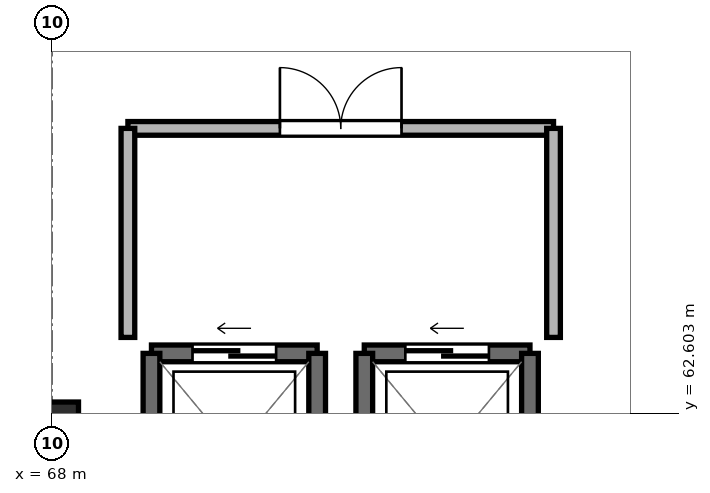
"""IFC4 building model, lengths in metres.
Left out: names, types, materials, properties, quantities, classifications, styles, units other than length and angle.
Written with IfcOpenShell. Run it as: python <this file> out.ifc"""

import sys

from ifc_helpers import new_model, si_unit, direction, frame, frame_2d, origin, origin_2d, place, context, subcontext, project, spatial, rectangle, extrude, element, fill, save


model = new_model("IFC4")
c1 = context("Model", 3, precision=1e-05, world=origin(), true_north=direction((0.0, 1.0)))
c2 = subcontext(c1, "Body", "Model", "MODEL_VIEW")
j1 = project(units=[si_unit("LENGTHUNIT", "METRE"), si_unit("PLANEANGLEUNIT", "RADIAN")], contexts=[c1])
p1 = place(None, origin())
s1 = spatial("IfcSite", under=j1, at=p1, CompositionType="ELEMENT")
p2 = place(p1, origin())
s2 = spatial("IfcBuilding", under=s1, at=p2, CompositionType="ELEMENT")
p3 = place(p2, frame((0.0, 0.0, 60.05)))
s3 = spatial("IfcBuildingStorey", under=s2, at=p3, CompositionType="ELEMENT", Elevation=60.05)
p4 = place(p3, frame((68.0, 62.4, -0.21), z_axis=(0.0, 0.0, 1.0), x_axis=(1.0, 0.0, 0.0)))
e1 = element("IfcColumn", 1, at=p4, inside=s3, PredefinedType="COLUMN", context=c2, shape_type="SweptSolid", body=[
    extrude(rectangle(XDim=0.7, YDim=0.7, at=origin_2d()), origin(), (0.0, 0.0, 1.0), 3.25),
])
p5 = place(p3, frame((71.49, 63.39, 0.0), z_axis=(0.0, 0.0, 1.0), x_axis=(-1.0, 0.0, 0.0)))
e2 = element("IfcWall", 2, at=p5, inside=s3, PredefinedType="SHEAR", context=c2, shape_type="SweptSolid", body=[
    extrude(rectangle(XDim=2.18, YDim=0.22, at=frame_2d((1.09, 0.0))), origin(), (0.0, 0.0, 1.0), 3.04),
])
p6 = place(p5, frame((0.54, 0.0, 0.0)))
e3 = element("IfcOpeningElement", 3, at=p6, cuts=e2, PredefinedType="OPENING", context=c2, shape_type="SweptSolid", body=[
    extrude(rectangle(XDim=1.1, YDim=2.2, at=frame_2d((0.55, 1.1))), frame((0.0, 0.122, 0.0), z_axis=(0.0, -1.0, 0.0), x_axis=(1.0, 0.0, 0.0)), (0.0, 0.0, 1.0), 0.244),
])
for number, where, z_axis, x_axis in (
    (4, (69.31, 63.39, 0.0), (0.0, 0.0, 1.0), (0.0, -1.0, 0.0)),
    (5, (71.49, 60.81, 0.0), (0.0, 0.0, 1.0), (0.0, 1.0, 0.0)),
):
    element("IfcWall", number, at=place(p3, frame(where, z_axis=z_axis, x_axis=x_axis)), inside=s3, PredefinedType="SHEAR", context=c2, shape_type="SweptSolid", body=[
        extrude(rectangle(XDim=2.58, YDim=0.22, at=frame_2d((1.29, 0.0))), origin(), (0.0, 0.0, 1.0), 3.04),
    ])
p7 = place(p3, frame((74.29, 63.39, 0.0), z_axis=(0.0, 0.0, 1.0), x_axis=(-1.0, 0.0, 0.0)))
e6 = element("IfcWall", 6, at=p7, inside=s3, PredefinedType="SHEAR", context=c2, shape_type="SweptSolid", body=[
    extrude(rectangle(XDim=2.18, YDim=0.22, at=frame_2d((1.09, 0.0))), origin(), (0.0, 0.0, 1.0), 3.04),
])
p8 = place(p7, frame((0.54, 0.0, 0.0)))
e7 = element("IfcOpeningElement", 7, at=p8, cuts=e6, PredefinedType="OPENING", context=c2, shape_type="SweptSolid", body=[
    extrude(rectangle(XDim=1.1, YDim=2.2, at=frame_2d((0.55, 1.1))), frame((0.0, 0.122, 0.0), z_axis=(0.0, -1.0, 0.0), x_axis=(1.0, 0.0, 0.0)), (0.0, 0.0, 1.0), 0.244),
])
for number, where, z_axis, x_axis in (
    (8, (72.11, 63.39, 0.0), (0.0, 0.0, 1.0), (0.0, -1.0, 0.0)),
    (9, (74.29, 60.81, 0.0), (0.0, 0.0, 1.0), (0.0, 1.0, 0.0)),
):
    element("IfcWall", number, at=place(p3, frame(where, z_axis=z_axis, x_axis=x_axis)), inside=s3, PredefinedType="SHEAR", context=c2, shape_type="SweptSolid", body=[
        extrude(rectangle(XDim=2.58, YDim=0.22, at=frame_2d((1.29, 0.0))), origin(), (0.0, 0.0, 1.0), 3.04),
    ])
p9 = place(p3, frame((69.0, 66.35, 0.0), z_axis=(0.0, 0.0, 1.0), x_axis=(1.0, 0.0, 0.0)))
e10 = element("IfcWall", 10, at=p9, inside=s3, PredefinedType="PARTITIONING", context=c2, shape_type="SweptSolid", body=[
    extrude(rectangle(XDim=5.6, YDim=0.18, at=frame_2d((2.8, 0.0))), origin(), (0.0, 0.0, 1.0), 2.53),
])
p10 = place(p9, frame((2.0, 0.0, 0.0)))
e11 = element("IfcOpeningElement", 11, at=p10, cuts=e10, PredefinedType="OPENING", context=c2, shape_type="SweptSolid", body=[
    extrude(rectangle(XDim=1.6, YDim=2.2, at=frame_2d((0.8, 1.1))), frame((0.0, 0.102, 0.0), z_axis=(0.0, -1.0, 0.0), x_axis=(1.0, 0.0, 0.0)), (0.0, 0.0, 1.0), 0.204),
])
for number, where, z_axis, x_axis in (
    (12, (69.0, 63.6, 0.0), (0.0, 0.0, 1.0), (0.0, 1.0, 0.0)),
    (13, (74.6, 63.6, 0.0), (0.0, 0.0, 1.0), (0.0, 1.0, 0.0)),
):
    element("IfcWall", number, at=place(p3, frame(where, z_axis=z_axis, x_axis=x_axis)), inside=s3, PredefinedType="PARTITIONING", context=c2, shape_type="SweptSolid", body=[
        extrude(rectangle(XDim=2.75, YDim=0.18, at=frame_2d((1.375, 0.0))), origin(), (0.0, 0.0, 1.0), 2.53),
    ])
p11 = place(p6, origin())
e14 = element("IfcDoor", 14, at=p11, inside=s3, OperationType="SLIDING_TO_RIGHT", PredefinedType="DOOR", context=c2, shape_type="SweptSolid", body=[
    extrude(rectangle(XDim=1.1, YDim=2.2, at=frame_2d((0.55, 1.1))), frame((0.0, 0.025, 0.0), z_axis=(0.0, -1.0, 0.0), x_axis=(1.0, 0.0, 0.0)), (0.0, 0.0, 1.0), 0.05),
])
fill(e3, e14)
p12 = place(p8, origin())
e15 = element("IfcDoor", 15, at=p12, inside=s3, OperationType="SLIDING_TO_RIGHT", PredefinedType="DOOR", context=c2, shape_type="SweptSolid", body=[
    extrude(rectangle(XDim=1.1, YDim=2.2, at=frame_2d((0.55, 1.1))), frame((0.0, 0.025, 0.0), z_axis=(0.0, -1.0, 0.0), x_axis=(1.0, 0.0, 0.0)), (0.0, 0.0, 1.0), 0.05),
])
fill(e7, e15)
p13 = place(p10, origin())
e16 = element("IfcDoor", 16, at=p13, inside=s3, OperationType="DOUBLE_DOOR_SINGLE_SWING", PredefinedType="DOOR", context=c2, shape_type="SweptSolid", body=[
    extrude(rectangle(XDim=1.6, YDim=2.2, at=frame_2d((0.8, 1.1))), frame((0.0, 0.025, 0.0), z_axis=(0.0, -1.0, 0.0), x_axis=(1.0, 0.0, 0.0)), (0.0, 0.0, 1.0), 0.05),
])
fill(e11, e16)
save(model, sys.argv[1])
